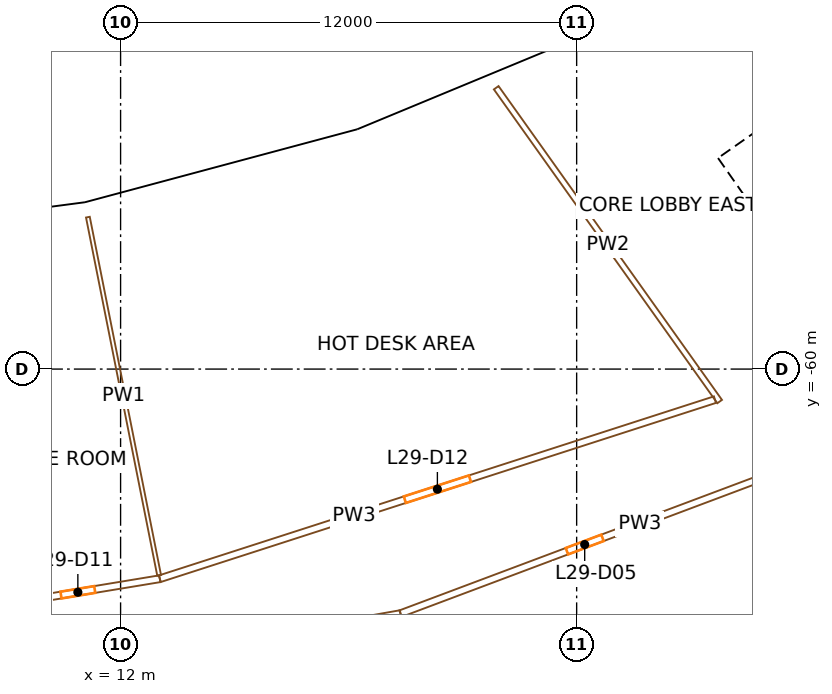
"""IFC4 building model, lengths in metres.
Left out: names, types, materials, properties, quantities, classifications, styles, units other than length and angle.
Written with IfcOpenShell. Run it as: python <this file> out.ifc"""

import sys

from ifc_helpers import new_model, si_unit, direction, frame, frame_2d, origin, origin_2d, place, context, subcontext, project, spatial, rectangle, extrude, element, fill, save


model = new_model("IFC4")
c1 = context("Model", 3, precision=1e-05, world=origin(), true_north=direction((0.0, 1.0)))
c2 = subcontext(c1, "Body", "Model", "MODEL_VIEW")
j1 = project(units=[si_unit("LENGTHUNIT", "METRE"), si_unit("PLANEANGLEUNIT", "RADIAN")], contexts=[c1])
p1 = place(None, origin())
s1 = spatial("IfcSite", under=j1, at=p1, CompositionType="ELEMENT")
p2 = place(p1, origin())
s2 = spatial("IfcBuilding", under=s1, at=p2, CompositionType="ELEMENT")
p3 = place(p2, frame((0.0, 0.0, 129.1)))
s3 = spatial("IfcBuildingStorey", under=s2, at=p3, CompositionType="ELEMENT", Elevation=129.1)
for number, where, z_axis, x_axis in (
    (1, (11.364, -57.131, 0.0), (0.0, 0.0, 1.0), (0.981, 0.195, 0.0)),
    (2, (18.724, -55.159, 0.0), (0.0, 0.0, 1.0), (0.947, 0.321, 0.0)),
    (3, (25.763, -52.243, 0.0), (0.0, 0.0, 1.0), (0.897, 0.442, 0.0)),
):
    element("IfcColumn", number, at=place(p3, frame(where, z_axis=z_axis, x_axis=x_axis)), inside=s3, PredefinedType="COLUMN", context=c2, shape_type="SweptSolid", body=[
        extrude(rectangle(XDim=1.2, YDim=1.5, at=origin_2d()), origin(), (0.0, 0.0, 1.0), 3.8),
    ])
p4 = place(p3, frame((36.717, -66.337, 0.0), z_axis=(0.0, 0.0, 1.0), x_axis=(-0.573577477574, 0.819151315216, 0.0)))
e4 = element("IfcWall", 4, at=p4, inside=s3, PredefinedType="SHEAR", context=c2, shape_type="SweptSolid", body=[
    extrude(rectangle(XDim=14.8, YDim=0.9, at=frame_2d((7.4, 0.0))), origin(), (0.0, 0.0, 1.0), 3.5),
])
p5 = place(p4, frame((6.2, 0.0, 0.0)))
e5 = element("IfcOpeningElement", 5, at=p5, cuts=e4, PredefinedType="OPENING", context=c2, shape_type="SweptSolid", body=[
    extrude(rectangle(XDim=2.4, YDim=2.1, at=frame_2d((1.2, 1.05))), frame((0.0, 0.46, 0.0), z_axis=(0.0, -1.0, 0.0), x_axis=(1.0, 0.0, 0.0)), (0.0, 0.0, 1.0), 0.92),
])
p6 = place(p3, frame((28.854, -54.324, 0.0), z_axis=(0.0, 0.0, 1.0), x_axis=(0.819145767589, 0.573585400304, 0.0)))
e6 = element("IfcWall", 6, at=p6, inside=s3, PredefinedType="SHEAR", context=c2, shape_type="SweptSolid", body=[
    extrude(rectangle(XDim=15.045, YDim=0.9, at=frame_2d((7.523, 0.0))), origin(), (0.0, 0.0, 1.0), 3.5),
])
p7 = place(p6, frame((1.05, 0.0, 0.0)))
e7 = element("IfcOpeningElement", 7, at=p7, cuts=e6, PredefinedType="OPENING", context=c2, shape_type="SweptSolid", body=[
    extrude(rectangle(XDim=0.9, YDim=2.1, at=frame_2d((0.45, 1.05))), frame((0.0, 0.46, 0.0), z_axis=(0.0, -1.0, 0.0), x_axis=(1.0, 0.0, 0.0)), (0.0, 0.0, 1.0), 0.92),
])
p8 = place(p6, frame((3.775, 0.0, 0.0)))
e8 = element("IfcOpeningElement", 8, at=p8, cuts=e6, PredefinedType="OPENING", context=c2, shape_type="SweptSolid", body=[
    extrude(rectangle(XDim=1.0, YDim=2.1, at=frame_2d((0.5, 1.05))), frame((0.0, 0.46, 0.0), z_axis=(0.0, -1.0, 0.0), x_axis=(1.0, 0.0, 0.0)), (0.0, 0.0, 1.0), 0.92),
])
p9 = place(p6, frame((6.275, 0.0, 0.0)))
e9 = element("IfcOpeningElement", 9, at=p9, cuts=e6, PredefinedType="OPENING", context=c2, shape_type="SweptSolid", body=[
    extrude(rectangle(XDim=1.0, YDim=2.1, at=frame_2d((0.5, 1.05))), frame((0.0, 0.46, 0.0), z_axis=(0.0, -1.0, 0.0), x_axis=(1.0, 0.0, 0.0)), (0.0, 0.0, 1.0), 0.92),
])
p10 = place(p6, frame((13.495, 0.0, 0.0)))
e10 = element("IfcOpeningElement", 10, at=p10, cuts=e6, PredefinedType="OPENING", context=c2, shape_type="SweptSolid", body=[
    extrude(rectangle(XDim=1.1, YDim=2.1, at=frame_2d((0.55, 1.05))), frame((0.0, 0.46, 0.0), z_axis=(0.0, -1.0, 0.0), x_axis=(1.0, 0.0, 0.0)), (0.0, 0.0, 1.0), 0.92),
])
p11 = place(p3, frame((11.125, -55.804, 0.0), z_axis=(0.0, 0.0, 1.0), x_axis=(-0.991444533306, -0.130528684121, 0.0)))
e11 = element("IfcWall", 11, at=p11, inside=s3, PredefinedType="SOLIDWALL", context=c2, shape_type="SweptSolid", body=[
    extrude(rectangle(XDim=7.493, YDim=0.4, at=frame_2d((3.747, 0.0))), origin(), (0.0, 0.0, 1.0), 2.7),
])
p12 = place(p11, frame((4.301, 0.0, 0.9)))
e12 = element("IfcOpeningElement", 12, at=p12, cuts=e11, PredefinedType="OPENING", context=c2, shape_type="SweptSolid", body=[
    extrude(rectangle(XDim=2.6, YDim=1.65, at=frame_2d((1.3, 0.825))), frame((0.0, 0.21, 0.0), z_axis=(0.0, -1.0, 0.0), x_axis=(1.0, 0.0, 0.0)), (0.0, 0.0, 1.0), 0.42),
])
p13 = place(p11, frame((0.592, 0.0, 0.9)))
e13 = element("IfcOpeningElement", 13, at=p13, cuts=e11, PredefinedType="OPENING", context=c2, shape_type="SweptSolid", body=[
    extrude(rectangle(XDim=2.6, YDim=1.65, at=frame_2d((1.3, 0.825))), frame((0.0, 0.21, 0.0), z_axis=(0.0, -1.0, 0.0), x_axis=(1.0, 0.0, 0.0)), (0.0, 0.0, 1.0), 0.42),
])
p14 = place(p3, frame((18.241, -53.894, 0.0), z_axis=(0.0, 0.0, 1.0), x_axis=(-0.965924597867, -0.258823629594, 0.0)))
e14 = element("IfcWall", 14, at=p14, inside=s3, PredefinedType="SOLIDWALL", context=c2, shape_type="SweptSolid", body=[
    extrude(rectangle(XDim=7.342, YDim=0.4, at=frame_2d((3.671, 0.0))), origin(), (0.0, 0.0, 1.0), 2.7),
])
p15 = place(p14, frame((4.225, 0.0, 0.9)))
e15 = element("IfcOpeningElement", 15, at=p15, cuts=e14, PredefinedType="OPENING", context=c2, shape_type="SweptSolid", body=[
    extrude(rectangle(XDim=2.6, YDim=1.65, at=frame_2d((1.3, 0.825))), frame((0.0, 0.21, 0.0), z_axis=(0.0, -1.0, 0.0), x_axis=(1.0, 0.0, 0.0)), (0.0, 0.0, 1.0), 0.42),
])
p16 = place(p14, frame((0.517, 0.0, 0.9)))
e16 = element("IfcOpeningElement", 16, at=p16, cuts=e14, PredefinedType="OPENING", context=c2, shape_type="SweptSolid", body=[
    extrude(rectangle(XDim=2.6, YDim=1.65, at=frame_2d((1.3, 0.825))), frame((0.0, 0.21, 0.0), z_axis=(0.0, -1.0, 0.0), x_axis=(1.0, 0.0, 0.0)), (0.0, 0.0, 1.0), 0.42),
])
p17 = place(p3, frame((25.189, -51.023, 0.0), z_axis=(0.0, 0.0, 1.0), x_axis=(-0.923879826967, -0.382682721486, 0.0)))
e17 = element("IfcWall", 17, at=p17, inside=s3, PredefinedType="SOLIDWALL", context=c2, shape_type="SweptSolid", body=[
    extrude(rectangle(XDim=7.493, YDim=0.4, at=frame_2d((3.747, 0.0))), origin(), (0.0, 0.0, 1.0), 2.7),
])
p18 = place(p17, frame((4.301, 0.0, 0.9)))
e18 = element("IfcOpeningElement", 18, at=p18, cuts=e17, PredefinedType="OPENING", context=c2, shape_type="SweptSolid", body=[
    extrude(rectangle(XDim=2.6, YDim=1.65, at=frame_2d((1.3, 0.825))), frame((0.0, 0.21, 0.0), z_axis=(0.0, -1.0, 0.0), x_axis=(1.0, 0.0, 0.0)), (0.0, 0.0, 1.0), 0.42),
])
p19 = place(p17, frame((0.592, 0.0, 0.9)))
e19 = element("IfcOpeningElement", 19, at=p19, cuts=e17, PredefinedType="OPENING", context=c2, shape_type="SweptSolid", body=[
    extrude(rectangle(XDim=2.6, YDim=1.65, at=frame_2d((1.3, 0.825))), frame((0.0, 0.21, 0.0), z_axis=(0.0, -1.0, 0.0), x_axis=(1.0, 0.0, 0.0)), (0.0, 0.0, 1.0), 0.42),
])
p20 = place(p3, frame((19.366, -66.435, 0.0), z_axis=(0.0, 0.0, 1.0), x_axis=(-0.984805080703, -0.173663332402, 0.0)))
e20 = element("IfcWall", 20, at=p20, inside=s3, PredefinedType="PARTITIONING", context=c2, shape_type="SweptSolid", body=[
    extrude(rectangle(XDim=15.069, YDim=0.18, at=frame_2d((7.535, 0.0))), origin(), (0.0, 0.0, 1.0), 2.4),
])
p21 = place(p20, frame((6.635, 0.0, 0.0)))
e21 = element("IfcOpeningElement", 21, at=p21, cuts=e20, PredefinedType="OPENING", context=c2, shape_type="SweptSolid", body=[
    extrude(rectangle(XDim=1.8, YDim=2.1, at=frame_2d((0.9, 1.05))), frame((0.0, 0.1, 0.0), z_axis=(0.0, -1.0, 0.0), x_axis=(1.0, 0.0, 0.0)), (0.0, 0.0, 1.0), 0.2),
])
p22 = place(p3, frame((8.719, -66.229, 0.0), z_axis=(0.0, 0.0, 1.0), x_axis=(0.986638873051, 0.162922479065, 0.0)))
e22 = element("IfcWall", 22, at=p22, inside=s3, PredefinedType="PARTITIONING", context=c2, shape_type="SweptSolid", body=[
    extrude(rectangle(XDim=4.371, YDim=0.18, at=frame_2d((2.186, 0.0))), origin(), (0.0, 0.0, 1.0), 2.4),
])
p23 = place(p22, frame((1.736, 0.0, 0.0)))
e23 = element("IfcOpeningElement", 23, at=p23, cuts=e22, PredefinedType="OPENING", context=c2, shape_type="SweptSolid", body=[
    extrude(rectangle(XDim=0.9, YDim=2.1, at=frame_2d((0.45, 1.05))), frame((0.0, 0.1, 0.0), z_axis=(0.0, -1.0, 0.0), x_axis=(1.0, 0.0, 0.0)), (0.0, 0.0, 1.0), 0.2),
])
p24 = place(p3, frame((11.14, -56.003, 0.0), z_axis=(0.0, 0.0, 1.0), x_axis=(0.195085169116, -0.980786305365, 0.0)))
e24 = element("IfcWall", 24, at=p24, inside=s3, PredefinedType="PARTITIONING", context=c2, shape_type="SweptSolid", body=[
    extrude(rectangle(XDim=9.61, YDim=0.1, at=frame_2d((4.805, 0.0))), origin(), (0.0, 0.0, 1.0), 2.4),
])
p25 = place(p3, frame((13.032, -65.516, 0.0), z_axis=(0.0, 0.0, 1.0), x_axis=(0.951705469381, 0.307012539729, 0.0)))
e25 = element("IfcWall", 25, at=p25, inside=s3, PredefinedType="PARTITIONING", context=c2, shape_type="SweptSolid", body=[
    extrude(rectangle(XDim=15.348, YDim=0.18, at=frame_2d((7.674, 0.0))), origin(), (0.0, 0.0, 1.0), 2.4),
])
p26 = place(p25, frame((6.774, 0.0, 0.0)))
e26 = element("IfcOpeningElement", 26, at=p26, cuts=e25, PredefinedType="OPENING", context=c2, shape_type="SweptSolid", body=[
    extrude(rectangle(XDim=1.8, YDim=2.1, at=frame_2d((0.9, 1.05))), frame((0.0, 0.1, 0.0), z_axis=(0.0, -1.0, 0.0), x_axis=(1.0, 0.0, 0.0)), (0.0, 0.0, 1.0), 0.2),
])
p27 = place(p3, frame((29.057, -62.798, 0.0), z_axis=(0.0, 0.0, 1.0), x_axis=(-0.936236096431, -0.351371557956, 0.0)))
e27 = element("IfcWall", 27, at=p27, inside=s3, PredefinedType="PARTITIONING", context=c2, shape_type="SweptSolid", body=[
    extrude(rectangle(XDim=10.352, YDim=0.18, at=frame_2d((5.176, 0.0))), origin(), (0.0, 0.0, 1.0), 2.4),
])
p28 = place(p27, frame((4.676, 0.0, 0.0)))
e28 = element("IfcOpeningElement", 28, at=p28, cuts=e27, PredefinedType="OPENING", context=c2, shape_type="SweptSolid", body=[
    extrude(rectangle(XDim=1.0, YDim=2.1, at=frame_2d((0.5, 1.05))), frame((0.0, 0.1, 0.0), z_axis=(0.0, -1.0, 0.0), x_axis=(1.0, 0.0, 0.0)), (0.0, 0.0, 1.0), 0.2),
])
p29 = place(p3, frame((21.884, -52.598, 0.0), z_axis=(0.0, 0.0, 1.0), x_axis=(0.580023139251, -0.814599998732, 0.0)))
e29 = element("IfcWall", 29, at=p29, inside=s3, PredefinedType="PARTITIONING", context=c2, shape_type="SweptSolid", body=[
    extrude(rectangle(XDim=10.136, YDim=0.15, at=frame_2d((5.068, 0.0))), origin(), (0.0, 0.0, 1.0), 2.4),
])
p30 = place(p13, origin())
e30 = element("IfcWindow", 30, at=p30, inside=s3, PartitioningType="SINGLE_PANEL", PredefinedType="WINDOW", context=c2, shape_type="SweptSolid", body=[
    extrude(rectangle(XDim=2.6, YDim=1.65, at=frame_2d((1.3, 0.825))), frame((0.0, 0.03, 0.0), z_axis=(0.0, -1.0, 0.0), x_axis=(1.0, 0.0, 0.0)), (0.0, 0.0, 1.0), 0.06),
])
fill(e13, e30)
p31 = place(p15, origin())
e31 = element("IfcWindow", 31, at=p31, inside=s3, PartitioningType="SINGLE_PANEL", PredefinedType="WINDOW", context=c2, shape_type="SweptSolid", body=[
    extrude(rectangle(XDim=2.6, YDim=1.65, at=frame_2d((1.3, 0.825))), frame((0.0, 0.03, 0.0), z_axis=(0.0, -1.0, 0.0), x_axis=(1.0, 0.0, 0.0)), (0.0, 0.0, 1.0), 0.06),
])
fill(e15, e31)
p32 = place(p16, origin())
e32 = element("IfcWindow", 32, at=p32, inside=s3, PartitioningType="SINGLE_PANEL", PredefinedType="WINDOW", context=c2, shape_type="SweptSolid", body=[
    extrude(rectangle(XDim=2.6, YDim=1.65, at=frame_2d((1.3, 0.825))), frame((0.0, 0.03, 0.0), z_axis=(0.0, -1.0, 0.0), x_axis=(1.0, 0.0, 0.0)), (0.0, 0.0, 1.0), 0.06),
])
fill(e16, e32)
p33 = place(p18, origin())
e33 = element("IfcWindow", 33, at=p33, inside=s3, PartitioningType="SINGLE_PANEL", PredefinedType="WINDOW", context=c2, shape_type="SweptSolid", body=[
    extrude(rectangle(XDim=2.6, YDim=1.65, at=frame_2d((1.3, 0.825))), frame((0.0, 0.03, 0.0), z_axis=(0.0, -1.0, 0.0), x_axis=(1.0, 0.0, 0.0)), (0.0, 0.0, 1.0), 0.06),
])
fill(e18, e33)
p34 = place(p19, origin())
e34 = element("IfcWindow", 34, at=p34, inside=s3, PartitioningType="SINGLE_PANEL", PredefinedType="WINDOW", context=c2, shape_type="SweptSolid", body=[
    extrude(rectangle(XDim=2.6, YDim=1.65, at=frame_2d((1.3, 0.825))), frame((0.0, 0.03, 0.0), z_axis=(0.0, -1.0, 0.0), x_axis=(1.0, 0.0, 0.0)), (0.0, 0.0, 1.0), 0.06),
])
fill(e19, e34)
p35 = place(p28, origin())
e35 = element("IfcDoor", 35, at=p35, inside=s3, OperationType="SINGLE_SWING_RIGHT", PredefinedType="DOOR", context=c2, shape_type="SweptSolid", body=[
    extrude(rectangle(XDim=1.0, YDim=2.1, at=frame_2d((0.5, 1.05))), frame((0.0, 0.025, 0.0), z_axis=(0.0, -1.0, 0.0), x_axis=(1.0, 0.0, 0.0)), (0.0, 0.0, 1.0), 0.05),
])
fill(e28, e35)
p36 = place(p23, origin())
e36 = element("IfcDoor", 36, at=p36, inside=s3, OperationType="SINGLE_SWING_RIGHT", PredefinedType="DOOR", context=c2, shape_type="SweptSolid", body=[
    extrude(rectangle(XDim=0.9, YDim=2.1, at=frame_2d((0.45, 1.05))), frame((0.0, 0.025, 0.0), z_axis=(0.0, -1.0, 0.0), x_axis=(1.0, 0.0, 0.0)), (0.0, 0.0, 1.0), 0.05),
])
fill(e23, e36)
p37 = place(p26, origin())
e37 = element("IfcDoor", 37, at=p37, inside=s3, OperationType="DOUBLE_DOOR_SINGLE_SWING", PredefinedType="DOOR", context=c2, shape_type="SweptSolid", body=[
    extrude(rectangle(XDim=1.8, YDim=2.1, at=frame_2d((0.9, 1.05))), frame((0.0, 0.025, 0.0), z_axis=(0.0, -1.0, 0.0), x_axis=(1.0, 0.0, 0.0)), (0.0, 0.0, 1.0), 0.05),
])
fill(e26, e37)
save(model, sys.argv[1])
